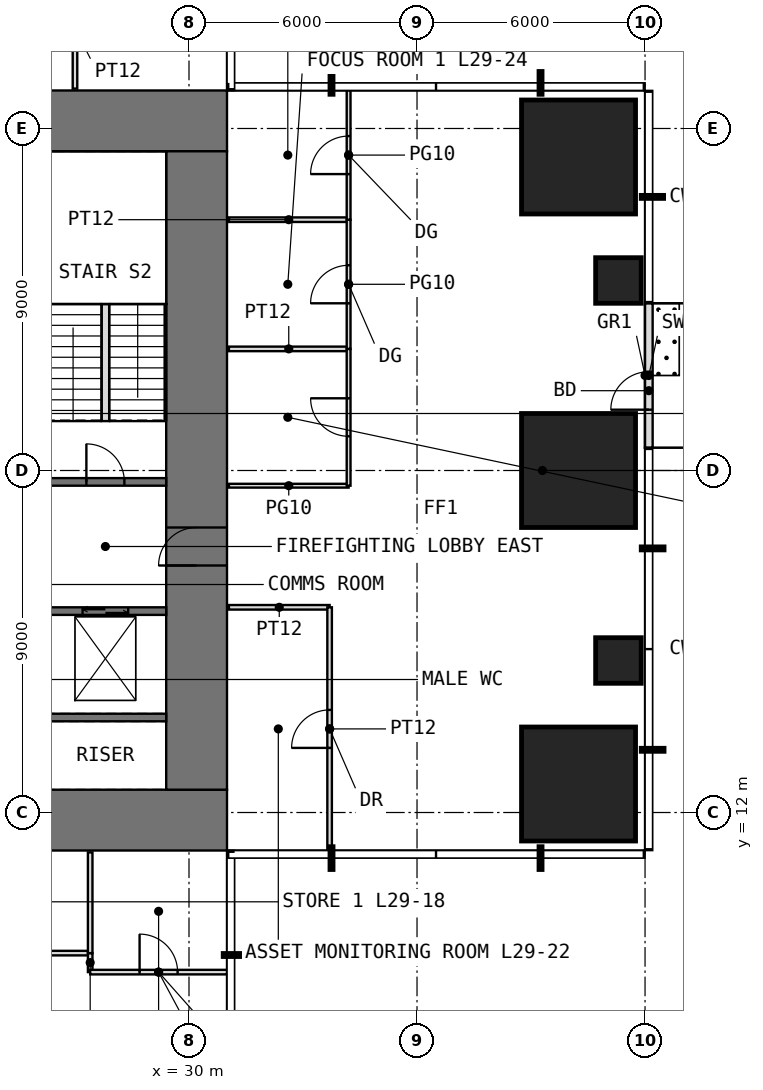
"""IFC4 building model, lengths in metres.
Left out: names, types, materials, properties, quantities, classifications, styles, units other than length and angle.
Written with IfcOpenShell. Run it as: python <this file> out.ifc"""

import sys

from ifc_helpers import new_model, si_unit, direction, frame, frame_2d, origin, origin_2d, place, context, subcontext, project, spatial, rectangle, extrude, element, fill, save


model = new_model("IFC4")
c1 = context("Model", 3, precision=1e-05, world=origin(), true_north=direction((0.0, 1.0)))
c2 = subcontext(c1, "Body", "Model", "MODEL_VIEW")
j1 = project(units=[si_unit("LENGTHUNIT", "METRE"), si_unit("PLANEANGLEUNIT", "RADIAN")], contexts=[c1])
p1 = place(None, origin())
s1 = spatial("IfcSite", under=j1, at=p1, CompositionType="ELEMENT")
p2 = place(p1, origin())
s2 = spatial("IfcBuilding", under=s1, at=p2, CompositionType="ELEMENT")
p3 = place(p2, frame((0.0, 0.0, 124.5)))
s3 = spatial("IfcBuildingStorey", under=s2, at=p3, CompositionType="ELEMENT", Elevation=124.5)
p4 = place(p3, frame((40.25, 12.75, 0.0), z_axis=(0.0, 0.0, 1.0), x_axis=(1.0, 0.0, 0.0)))
e1 = element("IfcColumn", 1, at=p4, inside=s3, PredefinedType="COLUMN", context=c2, shape_type="SweptSolid", body=[
    extrude(rectangle(XDim=3.0, YDim=3.0, at=origin_2d()), origin(), (0.0, 0.0, 1.0), 4.0),
])
p5 = place(p3, frame((41.3, 16.0, 0.0), z_axis=(0.0, 0.0, 1.0), x_axis=(1.0, 0.0, 0.0)))
e2 = element("IfcColumn", 2, at=p5, inside=s3, PredefinedType="COLUMN", context=c2, shape_type="SweptSolid", body=[
    extrude(rectangle(XDim=1.2, YDim=1.2, at=origin_2d()), origin(), (0.0, 0.0, 1.0), 4.0),
])
p6 = place(p3, frame((40.25, 21.0, 0.0), z_axis=(0.0, 0.0, 1.0), x_axis=(1.0, 0.0, 0.0)))
e3 = element("IfcColumn", 3, at=p6, inside=s3, PredefinedType="COLUMN", context=c2, shape_type="SweptSolid", body=[
    extrude(rectangle(XDim=3.0, YDim=3.0, at=origin_2d()), origin(), (0.0, 0.0, 1.0), 4.0),
])
p7 = place(p3, frame((41.3, 26.0, 0.0), z_axis=(0.0, 0.0, 1.0), x_axis=(1.0, 0.0, 0.0)))
e4 = element("IfcColumn", 4, at=p7, inside=s3, PredefinedType="COLUMN", context=c2, shape_type="SweptSolid", body=[
    extrude(rectangle(XDim=1.2, YDim=1.2, at=origin_2d()), origin(), (0.0, 0.0, 1.0), 4.0),
])
p8 = place(p3, frame((40.25, 29.25, 0.0), z_axis=(0.0, 0.0, 1.0), x_axis=(1.0, 0.0, 0.0)))
e5 = element("IfcColumn", 5, at=p8, inside=s3, PredefinedType="COLUMN", context=c2, shape_type="SweptSolid", body=[
    extrude(rectangle(XDim=3.0, YDim=3.0, at=origin_2d()), origin(), (0.0, 0.0, 1.0), 4.0),
])
p9 = place(p3, frame((42.1, 21.6, 0.0), z_axis=(0.0, 0.0, 1.0), x_axis=(0.0, 1.0, 0.0)))
e6 = element("IfcWall", 6, at=p9, inside=s3, PredefinedType="USERDEFINED", context=c2, shape_type="SweptSolid", body=[
    extrude(rectangle(XDim=3.8, YDim=0.2, at=frame_2d((1.9, 0.0))), origin(), (0.0, 0.0, 1.0), 3.75),
])
p10 = place(p9, frame((1.0, 0.0, 0.0)))
e7 = element("IfcOpeningElement", 7, at=p10, cuts=e6, PredefinedType="OPENING", context=c2, shape_type="SweptSolid", body=[
    extrude(rectangle(XDim=1.0, YDim=2.4, at=frame_2d((0.5, 1.2))), frame((0.0, 0.11, 0.0), z_axis=(0.0, -1.0, 0.0), x_axis=(1.0, 0.0, 0.0)), (0.0, 0.0, 1.0), 0.22),
])
p11 = place(p3, frame((11.0, 11.8, -0.05), z_axis=(0.0, 0.0, 1.0), x_axis=(1.0, 0.0, 0.0)))
e8 = element("IfcWall", 8, at=p11, inside=s3, PredefinedType="SHEAR", context=c2, shape_type="SweptSolid", body=[
    extrude(rectangle(XDim=20.0, YDim=1.6, at=frame_2d((10.0, 0.0))), origin(), (0.0, 0.0, 1.0), 4.0),
])
p12 = place(p11, frame((9.0, 0.0, 0.05)))
e9 = element("IfcOpeningElement", 9, at=p12, cuts=e8, PredefinedType="OPENING", context=c2, shape_type="SweptSolid", body=[
    extrude(rectangle(XDim=2.0, YDim=2.2, at=frame_2d((1.0, 1.1))), frame((0.0, 0.81, 0.0), z_axis=(0.0, -1.0, 0.0), x_axis=(1.0, 0.0, 0.0)), (0.0, 0.0, 1.0), 1.62),
])
p13 = place(p3, frame((11.0, 30.2, -0.05), z_axis=(0.0, 0.0, 1.0), x_axis=(1.0, 0.0, 0.0)))
e10 = element("IfcWall", 10, at=p13, inside=s3, PredefinedType="SHEAR", context=c2, shape_type="SweptSolid", body=[
    extrude(rectangle(XDim=20.0, YDim=1.6, at=frame_2d((10.0, 0.0))), origin(), (0.0, 0.0, 1.0), 4.0),
])
p14 = place(p13, frame((9.0, 0.0, 0.05)))
e11 = element("IfcOpeningElement", 11, at=p14, cuts=e10, PredefinedType="OPENING", context=c2, shape_type="SweptSolid", body=[
    extrude(rectangle(XDim=2.0, YDim=2.2, at=frame_2d((1.0, 1.1))), frame((0.0, 0.81, 0.0), z_axis=(0.0, -1.0, 0.0), x_axis=(1.0, 0.0, 0.0)), (0.0, 0.0, 1.0), 1.62),
])
p15 = place(p3, frame((30.2, 12.6, -0.05), z_axis=(0.0, 0.0, 1.0), x_axis=(0.0, 1.0, 0.0)))
e12 = element("IfcWall", 12, at=p15, inside=s3, PredefinedType="SHEAR", context=c2, shape_type="SweptSolid", body=[
    extrude(rectangle(XDim=16.8, YDim=1.6, at=frame_2d((8.4, 0.0))), origin(), (0.0, 0.0, 1.0), 4.0),
])
p16 = place(p15, frame((5.9, 0.0, 0.05)))
e13 = element("IfcOpeningElement", 13, at=p16, cuts=e12, PredefinedType="OPENING", context=c2, shape_type="SweptSolid", body=[
    extrude(rectangle(XDim=1.0, YDim=2.2, at=frame_2d((0.5, 1.1))), frame((0.0, 0.81, 0.0), z_axis=(0.0, -1.0, 0.0), x_axis=(1.0, 0.0, 0.0)), (0.0, 0.0, 1.0), 1.62),
])
p17 = place(p3, frame((26.2, 14.5, -0.05), z_axis=(0.0, 0.0, 1.0), x_axis=(1.0, 0.0, 0.0)))
e14 = element("IfcWall", 14, at=p17, inside=s3, PredefinedType="SHEAR", context=c2, shape_type="SweptSolid", body=[
    extrude(rectangle(XDim=3.2, YDim=0.2, at=frame_2d((1.6, 0.0))), origin(), (0.0, 0.0, 1.0), 4.0),
])
p18 = place(p3, frame((26.2, 17.3, -0.05), z_axis=(0.0, 0.0, 1.0), x_axis=(1.0, 0.0, 0.0)))
e15 = element("IfcWall", 15, at=p18, inside=s3, PredefinedType="SHEAR", context=c2, shape_type="SweptSolid", body=[
    extrude(rectangle(XDim=3.2, YDim=0.2, at=frame_2d((1.6, 0.0))), origin(), (0.0, 0.0, 1.0), 4.0),
])
p19 = place(p18, frame((1.0, 0.0, 0.05)))
e16 = element("IfcOpeningElement", 16, at=p19, cuts=e15, PredefinedType="OPENING", context=c2, shape_type="SweptSolid", body=[
    extrude(rectangle(XDim=1.2, YDim=2.2, at=frame_2d((0.6, 1.1))), frame((0.0, 0.11, 0.0), z_axis=(0.0, -1.0, 0.0), x_axis=(1.0, 0.0, 0.0)), (0.0, 0.0, 1.0), 0.22),
])
p20 = place(p3, frame((26.2, 20.7, -0.05), z_axis=(0.0, 0.0, 1.0), x_axis=(1.0, 0.0, 0.0)))
e17 = element("IfcWall", 17, at=p20, inside=s3, PredefinedType="SHEAR", context=c2, shape_type="SweptSolid", body=[
    extrude(rectangle(XDim=3.2, YDim=0.2, at=frame_2d((1.6, 0.0))), origin(), (0.0, 0.0, 1.0), 4.0),
])
p21 = place(p20, frame((1.1, 0.0, 0.05)))
e18 = element("IfcOpeningElement", 18, at=p21, cuts=e17, PredefinedType="OPENING", context=c2, shape_type="SweptSolid", body=[
    extrude(rectangle(XDim=1.0, YDim=2.2, at=frame_2d((0.5, 1.1))), frame((0.0, 0.11, 0.0), z_axis=(0.0, -1.0, 0.0), x_axis=(1.0, 0.0, 0.0)), (0.0, 0.0, 1.0), 0.22),
])
p22 = place(p3, frame((23.4, 8.3, 0.0), z_axis=(0.0, 0.0, 1.0), x_axis=(1.0, 0.0, 0.0)))
e19 = element("IfcWall", 19, at=p22, inside=s3, PredefinedType="PARTITIONING", context=c2, shape_type="SweptSolid", body=[
    extrude(rectangle(XDim=4.0, YDim=0.12, at=frame_2d((2.0, 0.0))), origin(), (0.0, 0.0, 1.0), 3.75),
])
p23 = place(p22, frame((1.5, 0.0, 0.0)))
e20 = element("IfcOpeningElement", 20, at=p23, cuts=e19, PredefinedType="OPENING", context=c2, shape_type="SweptSolid", body=[
    extrude(rectangle(XDim=1.0, YDim=2.2, at=frame_2d((0.5, 1.1))), frame((0.0, 0.07, 0.0), z_axis=(0.0, -1.0, 0.0), x_axis=(1.0, 0.0, 0.0)), (0.0, 0.0, 1.0), 0.14),
])
p24 = place(p3, frame((27.0, 31.05, 0.0), z_axis=(0.0, 0.0, 1.0), x_axis=(0.0, 1.0, 0.0)))
e21 = element("IfcWall", 21, at=p24, inside=s3, PredefinedType="PARTITIONING", context=c2, shape_type="SweptSolid", body=[
    extrude(rectangle(XDim=3.15, YDim=0.12, at=frame_2d((1.575, 0.0))), origin(), (0.0, 0.0, 1.0), 3.75),
])
p25 = place(p3, frame((27.4, 7.8, 0.0), z_axis=(0.0, 0.0, 1.0), x_axis=(0.0, 1.0, 0.0)))
e22 = element("IfcWall", 22, at=p25, inside=s3, PredefinedType="PARTITIONING", context=c2, shape_type="SweptSolid", body=[
    extrude(rectangle(XDim=0.5, YDim=0.12, at=frame_2d((0.25, 0.0))), origin(), (0.0, 0.0, 1.0), 3.75),
])
p26 = place(p3, frame((27.4, 7.8, 0.0), z_axis=(0.0, 0.0, 1.0), x_axis=(1.0, 0.0, 0.0)))
e23 = element("IfcWall", 23, at=p26, inside=s3, PredefinedType="PARTITIONING", context=c2, shape_type="SweptSolid", body=[
    extrude(rectangle(XDim=3.6, YDim=0.12, at=frame_2d((1.8, 0.0))), origin(), (0.0, 0.0, 1.0), 3.75),
])
p27 = place(p26, frame((1.3, 0.0, 0.0)))
e24 = element("IfcOpeningElement", 24, at=p27, cuts=e23, PredefinedType="OPENING", context=c2, shape_type="SweptSolid", body=[
    extrude(rectangle(XDim=1.0, YDim=2.2, at=frame_2d((0.5, 1.1))), frame((0.0, 0.07, 0.0), z_axis=(0.0, -1.0, 0.0), x_axis=(1.0, 0.0, 0.0)), (0.0, 0.0, 1.0), 0.14),
])
for number, where, z_axis, x_axis in (
    (25, (27.4, 8.3, 0.0), (0.0, 0.0, 1.0), (0.0, 1.0, 0.0)),
    (26, (31.05, 17.4, 0.0), (0.0, 0.0, 1.0), (1.0, 0.0, 0.0)),
):
    element("IfcWall", number, at=place(p3, frame(where, z_axis=z_axis, x_axis=x_axis)), inside=s3, PredefinedType="PARTITIONING", context=c2, shape_type="SweptSolid", body=[
        extrude(rectangle(XDim=2.65, YDim=0.12, at=frame_2d((1.325, 0.0))), origin(), (0.0, 0.0, 1.0), 3.75),
    ])
p28 = place(p3, frame((31.05, 20.6, 0.0), z_axis=(0.0, 0.0, 1.0), x_axis=(1.0, 0.0, 0.0)))
e27 = element("IfcWall", 27, at=p28, inside=s3, PredefinedType="PARTITIONING", context=c2, shape_type="SweptSolid", body=[
    extrude(rectangle(XDim=3.15, YDim=0.1, at=frame_2d((1.575, 0.0))), origin(), (0.0, 0.0, 1.0), 3.75),
])
for number, where, z_axis, x_axis in (
    (28, (31.05, 24.2, 0.0), (0.0, 0.0, 1.0), (1.0, 0.0, 0.0)),
    (29, (31.05, 27.6, 0.0), (0.0, 0.0, 1.0), (1.0, 0.0, 0.0)),
):
    element("IfcWall", number, at=place(p3, frame(where, z_axis=z_axis, x_axis=x_axis)), inside=s3, PredefinedType="PARTITIONING", context=c2, shape_type="SweptSolid", body=[
        extrude(rectangle(XDim=3.15, YDim=0.12, at=frame_2d((1.575, 0.0))), origin(), (0.0, 0.0, 1.0), 3.75),
    ])
p29 = place(p3, frame((33.7, 11.0, 0.0), z_axis=(0.0, 0.0, 1.0), x_axis=(0.0, 1.0, 0.0)))
e30 = element("IfcWall", 30, at=p29, inside=s3, PredefinedType="PARTITIONING", context=c2, shape_type="SweptSolid", body=[
    extrude(rectangle(XDim=6.4, YDim=0.12, at=frame_2d((3.2, 0.0))), origin(), (0.0, 0.0, 1.0), 3.75),
])
p30 = place(p29, frame((2.7, 0.0, 0.0)))
e31 = element("IfcOpeningElement", 31, at=p30, cuts=e30, PredefinedType="OPENING", context=c2, shape_type="SweptSolid", body=[
    extrude(rectangle(XDim=1.0, YDim=2.2, at=frame_2d((0.5, 1.1))), frame((0.0, 0.07, 0.0), z_axis=(0.0, -1.0, 0.0), x_axis=(1.0, 0.0, 0.0)), (0.0, 0.0, 1.0), 0.14),
])
p31 = place(p3, frame((34.2, 20.6, 0.0), z_axis=(0.0, 0.0, 1.0), x_axis=(0.0, 1.0, 0.0)))
e32 = element("IfcWall", 32, at=p31, inside=s3, PredefinedType="PARTITIONING", context=c2, shape_type="SweptSolid", body=[
    extrude(rectangle(XDim=3.6, YDim=0.1, at=frame_2d((1.8, 0.0))), origin(), (0.0, 0.0, 1.0), 3.75),
])
p32 = place(p31, frame((1.3, 0.0, 0.0)))
e33 = element("IfcOpeningElement", 33, at=p32, cuts=e32, PredefinedType="OPENING", context=c2, shape_type="SweptSolid", body=[
    extrude(rectangle(XDim=1.0, YDim=2.4, at=frame_2d((0.5, 1.2))), frame((0.0, 0.06, 0.0), z_axis=(0.0, -1.0, 0.0), x_axis=(1.0, 0.0, 0.0)), (0.0, 0.0, 1.0), 0.12),
])
p33 = place(p3, frame((34.2, 24.2, 0.0), z_axis=(0.0, 0.0, 1.0), x_axis=(0.0, 1.0, 0.0)))
e34 = element("IfcWall", 34, at=p33, inside=s3, PredefinedType="PARTITIONING", context=c2, shape_type="SweptSolid", body=[
    extrude(rectangle(XDim=3.4, YDim=0.1, at=frame_2d((1.7, 0.0))), origin(), (0.0, 0.0, 1.0), 3.75),
])
p34 = place(p33, frame((1.2, 0.0, 0.0)))
e35 = element("IfcOpeningElement", 35, at=p34, cuts=e34, PredefinedType="OPENING", context=c2, shape_type="SweptSolid", body=[
    extrude(rectangle(XDim=1.0, YDim=2.4, at=frame_2d((0.5, 1.2))), frame((0.0, 0.06, 0.0), z_axis=(0.0, -1.0, 0.0), x_axis=(1.0, 0.0, 0.0)), (0.0, 0.0, 1.0), 0.12),
])
p35 = place(p3, frame((34.2, 27.6, 0.0), z_axis=(0.0, 0.0, 1.0), x_axis=(0.0, 1.0, 0.0)))
e36 = element("IfcWall", 36, at=p35, inside=s3, PredefinedType="PARTITIONING", context=c2, shape_type="SweptSolid", body=[
    extrude(rectangle(XDim=3.4, YDim=0.1, at=frame_2d((1.7, 0.0))), origin(), (0.0, 0.0, 1.0), 3.75),
])
p36 = place(p35, frame((1.2, 0.0, 0.0)))
e37 = element("IfcOpeningElement", 37, at=p36, cuts=e36, PredefinedType="OPENING", context=c2, shape_type="SweptSolid", body=[
    extrude(rectangle(XDim=1.0, YDim=2.4, at=frame_2d((0.5, 1.2))), frame((0.0, 0.06, 0.0), z_axis=(0.0, -1.0, 0.0), x_axis=(1.0, 0.0, 0.0)), (0.0, 0.0, 1.0), 0.12),
])
p37 = place(p3, frame((27.8, 22.3, 0.0), z_axis=(0.0, 0.0, 1.0), x_axis=(0.0, 1.0, 0.0)))
e38 = element("IfcWall", 38, at=p37, inside=s3, PredefinedType="PARTITIONING", context=c2, shape_type="SweptSolid", body=[
    extrude(rectangle(XDim=3.08, YDim=0.2, at=frame_2d((1.54, 0.0))), origin(), (0.0, 0.0, 1.0), 4.0),
])
p38 = place(p10, origin())
e39 = element("IfcDoor", 39, at=p38, inside=s3, OperationType="SINGLE_SWING_LEFT", PredefinedType="DOOR", context=c2, shape_type="SweptSolid", body=[
    extrude(rectangle(XDim=1.0, YDim=2.4, at=frame_2d((0.5, 1.2))), frame((0.0, 0.025, 0.0), z_axis=(0.0, -1.0, 0.0), x_axis=(1.0, 0.0, 0.0)), (0.0, 0.0, 1.0), 0.05),
])
fill(e7, e39)
p39 = place(p16, origin())
e40 = element("IfcDoor", 40, at=p39, inside=s3, OperationType="SINGLE_SWING_LEFT", PredefinedType="DOOR", context=c2, shape_type="SweptSolid", body=[
    extrude(rectangle(XDim=1.0, YDim=2.2, at=frame_2d((0.5, 1.1))), frame((0.0, 0.025, 0.0), z_axis=(0.0, -1.0, 0.0), x_axis=(1.0, 0.0, 0.0)), (0.0, 0.0, 1.0), 0.05),
])
fill(e13, e40)
p40 = place(p21, origin())
e41 = element("IfcDoor", 41, at=p40, inside=s3, OperationType="SINGLE_SWING_LEFT", PredefinedType="DOOR", context=c2, shape_type="SweptSolid", body=[
    extrude(rectangle(XDim=1.0, YDim=2.2, at=frame_2d((0.5, 1.1))), frame((0.0, 0.025, 0.0), z_axis=(0.0, -1.0, 0.0), x_axis=(1.0, 0.0, 0.0)), (0.0, 0.0, 1.0), 0.05),
])
fill(e18, e41)
p41 = place(p27, origin())
e42 = element("IfcDoor", 42, at=p41, inside=s3, OperationType="SINGLE_SWING_LEFT", PredefinedType="DOOR", context=c2, shape_type="SweptSolid", body=[
    extrude(rectangle(XDim=1.0, YDim=2.2, at=frame_2d((0.5, 1.1))), frame((0.0, 0.025, 0.0), z_axis=(0.0, -1.0, 0.0), x_axis=(1.0, 0.0, 0.0)), (0.0, 0.0, 1.0), 0.05),
])
fill(e24, e42)
p42 = place(p30, origin())
e43 = element("IfcDoor", 43, at=p42, inside=s3, OperationType="SINGLE_SWING_LEFT", PredefinedType="DOOR", context=c2, shape_type="SweptSolid", body=[
    extrude(rectangle(XDim=1.0, YDim=2.2, at=frame_2d((0.5, 1.1))), frame((0.0, 0.025, 0.0), z_axis=(0.0, -1.0, 0.0), x_axis=(1.0, 0.0, 0.0)), (0.0, 0.0, 1.0), 0.05),
])
fill(e31, e43)
p43 = place(p32, origin())
e44 = element("IfcDoor", 44, at=p43, inside=s3, OperationType="SINGLE_SWING_RIGHT", PredefinedType="DOOR", context=c2, shape_type="SweptSolid", body=[
    extrude(rectangle(XDim=1.0, YDim=2.4, at=frame_2d((0.5, 1.2))), frame((0.0, 0.025, 0.0), z_axis=(0.0, -1.0, 0.0), x_axis=(1.0, 0.0, 0.0)), (0.0, 0.0, 1.0), 0.05),
])
fill(e33, e44)
p44 = place(p34, origin())
e45 = element("IfcDoor", 45, at=p44, inside=s3, OperationType="SINGLE_SWING_LEFT", PredefinedType="DOOR", context=c2, shape_type="SweptSolid", body=[
    extrude(rectangle(XDim=1.0, YDim=2.4, at=frame_2d((0.5, 1.2))), frame((0.0, 0.025, 0.0), z_axis=(0.0, -1.0, 0.0), x_axis=(1.0, 0.0, 0.0)), (0.0, 0.0, 1.0), 0.05),
])
fill(e35, e45)
p45 = place(p36, origin())
e46 = element("IfcDoor", 46, at=p45, inside=s3, OperationType="SINGLE_SWING_LEFT", PredefinedType="DOOR", context=c2, shape_type="SweptSolid", body=[
    extrude(rectangle(XDim=1.0, YDim=2.4, at=frame_2d((0.5, 1.2))), frame((0.0, 0.025, 0.0), z_axis=(0.0, -1.0, 0.0), x_axis=(1.0, 0.0, 0.0)), (0.0, 0.0, 1.0), 0.05),
])
fill(e37, e46)
p46 = place(p19, origin())
e47 = element("IfcDoor", 47, at=p46, inside=s3, OperationType="DOUBLE_DOOR_SLIDING", PredefinedType="DOOR", context=c2, shape_type="SweptSolid", body=[
    extrude(rectangle(XDim=1.2, YDim=2.2, at=frame_2d((0.6, 1.1))), frame((0.0, 0.025, 0.0), z_axis=(0.0, -1.0, 0.0), x_axis=(1.0, 0.0, 0.0)), (0.0, 0.0, 1.0), 0.05),
])
fill(e16, e47)
save(model, sys.argv[1])
